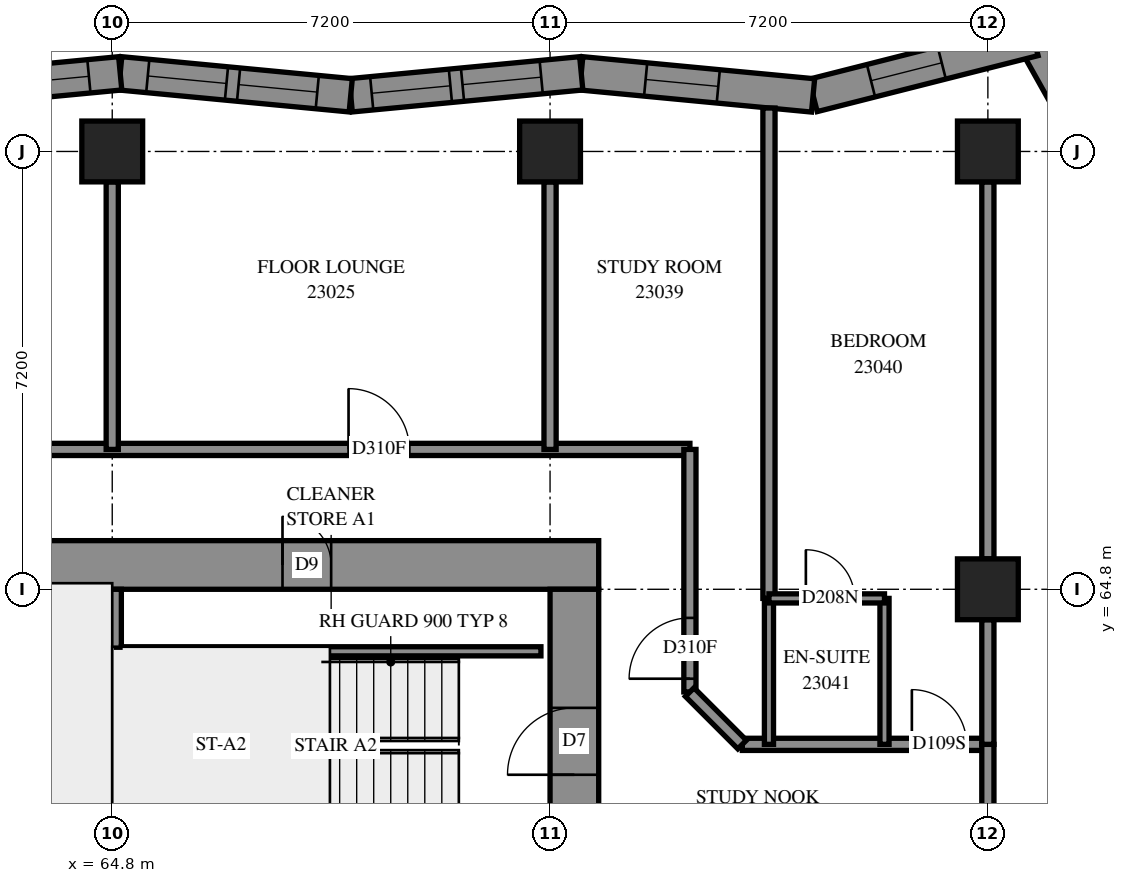
"""IFC4 building model, lengths in metres.
Left out: names, types, materials, properties, quantities, classifications, styles, units other than length and angle.
Written with IfcOpenShell. Run it as: python <this file> out.ifc"""

import sys

from ifc_helpers import new_model, si_unit, direction, frame, frame_2d, origin, origin_2d, place, context, subcontext, project, spatial, polyline, rectangle, outline, extrude, element, fill, save


model = new_model("IFC4")
c1 = context("Model", 3, precision=1e-05, world=origin(), true_north=direction((0.0, 1.0)))
c2 = subcontext(c1, "Body", "Model", "MODEL_VIEW")
j1 = project(units=[si_unit("LENGTHUNIT", "METRE"), si_unit("PLANEANGLEUNIT", "RADIAN")], contexts=[c1])
p1 = place(None, origin())
s1 = spatial("IfcSite", under=j1, at=p1, CompositionType="ELEMENT")
p2 = place(p1, origin())
s2 = spatial("IfcBuilding", under=s1, at=p2, CompositionType="ELEMENT")
p3 = place(p2, frame((0.0, 0.0, 88.0)))
s3 = spatial("IfcBuildingStorey", under=s2, at=p3, CompositionType="ELEMENT", Elevation=88.0)
for number, where, z_axis, x_axis in (
    (1, (64.8, 72.0, 0.0), (0.0, 0.0, 1.0), (1.0, 0.0, 0.0)),
    (2, (72.0, 72.0, 0.0), (0.0, 0.0, 1.0), (1.0, 0.0, 0.0)),
    (3, (79.2, 64.8, 0.0), (0.0, 0.0, 1.0), (1.0, 0.0, 0.0)),
    (4, (79.2, 72.0, 0.0), (0.0, 0.0, 1.0), (1.0, 0.0, 0.0)),
):
    element("IfcColumn", number, at=place(p3, frame(where, z_axis=z_axis, x_axis=x_axis)), inside=s3, PredefinedType="COLUMN", context=c2, shape_type="SweptSolid", body=[
        extrude(rectangle(XDim=1.0, YDim=1.0, at=origin_2d()), origin(), (0.0, 0.0, 1.0), 3.1),
    ])
p4 = place(p3, frame((56.8, 65.2, -0.3), z_axis=(0.0, 0.0, 1.0), x_axis=(1.0, 0.0, 0.0)))
e5 = element("IfcWall", 5, at=p4, inside=s3, PredefinedType="SHEAR", context=c2, shape_type="SweptSolid", body=[
    extrude(rectangle(XDim=16.0, YDim=0.8, at=frame_2d((8.0, 0.0))), origin(), (0.0, 0.0, 1.0), 2.7),
])
p5 = place(p4, frame((10.8, 0.0, 0.3)))
e6 = element("IfcOpeningElement", 6, at=p5, cuts=e5, PredefinedType="OPENING", context=c2, shape_type="SweptSolid", body=[
    extrude(rectangle(XDim=0.8, YDim=2.1, at=frame_2d((0.4, 1.05))), frame((0.0, 0.41, 0.0), z_axis=(0.0, -1.0, 0.0), x_axis=(1.0, 0.0, 0.0)), (0.0, 0.0, 1.0), 0.82),
])
p6 = place(p3, frame((72.4, 50.4, -0.3), z_axis=(0.0, 0.0, 1.0), x_axis=(0.0, 1.0, 0.0)))
e7 = element("IfcWall", 7, at=p6, inside=s3, PredefinedType="SHEAR", context=c2, shape_type="SweptSolid", body=[
    extrude(rectangle(XDim=14.4, YDim=0.8, at=frame_2d((7.2, 0.0))), origin(), (0.0, 0.0, 1.0), 2.7),
])
p7 = place(p6, frame((4.55, 0.0, 0.3)))
e8 = element("IfcOpeningElement", 8, at=p7, cuts=e7, PredefinedType="OPENING", context=c2, shape_type="SweptSolid", body=[
    extrude(rectangle(XDim=1.1, YDim=2.1, at=frame_2d((0.55, 1.05))), frame((0.0, 0.41, 0.0), z_axis=(0.0, -1.0, 0.0), x_axis=(1.0, 0.0, 0.0)), (0.0, 0.0, 1.0), 0.82),
])
p8 = place(p6, frame((11.35, 0.0, 0.3)))
e9 = element("IfcOpeningElement", 9, at=p8, cuts=e7, PredefinedType="OPENING", context=c2, shape_type="SweptSolid", body=[
    extrude(rectangle(XDim=1.1, YDim=2.1, at=frame_2d((0.55, 1.05))), frame((0.0, 0.41, 0.0), z_axis=(0.0, -1.0, 0.0), x_axis=(1.0, 0.0, 0.0)), (0.0, 0.0, 1.0), 0.82),
])
p9 = place(p3, frame((64.8, 60.6, 0.0), z_axis=(0.0, 0.0, 1.0), x_axis=(0.0, 1.0, 0.0)))
e10 = element("IfcWall", 10, at=p9, inside=s3, PredefinedType="SOLIDWALL", context=c2, shape_type="SweptSolid", body=[
    extrude(rectangle(XDim=4.2, YDim=0.3, at=frame_2d((2.1, 0.0))), origin(), (0.0, 0.0, 1.0), 3.1),
])
p10 = place(p3, frame((81.611, 70.892, 0.0), z_axis=(0.0, 0.0, 1.0), x_axis=(-0.4885601475, 0.8725302186, 0.0)))
e11 = element("IfcWall", 11, at=p10, inside=s3, PredefinedType="SOLIDWALL", context=c2, shape_type="SweptSolid", body=[
    extrude(outline(polyline([(0.053, -0.275), (3.593, -0.275), (3.171, 0.275), (-0.053, 0.275), (0.053, -0.275)])), origin(), (0.0, 0.0, 1.0), 3.1),
])
p11 = place(p10, frame((0.793, 0.0, 0.5)))
e12 = element("IfcOpeningElement", 12, at=p11, cuts=e11, PredefinedType="OPENING", context=c2, shape_type="SweptSolid", body=[
    extrude(rectangle(XDim=1.2, YDim=2.45, at=frame_2d((0.6, 1.225))), frame((0.0, 0.285, 0.0), z_axis=(0.0, -1.0, 0.0), x_axis=(1.0, 0.0, 0.0)), (0.0, 0.0, 1.0), 0.57),
])
p12 = place(p3, frame((79.958, 73.843, 0.0), z_axis=(0.0, 0.0, 1.0), x_axis=(-0.9693399067, -0.2457237173, 0.0)))
e13 = element("IfcWall", 13, at=p12, inside=s3, PredefinedType="SOLIDWALL", context=c2, shape_type="SweptSolid", body=[
    extrude(outline(polyline([(-0.211, -0.275), (3.7, -0.275), (3.795, 0.275), (0.211, 0.275), (-0.211, -0.275)])), origin(), (0.0, 0.0, 1.0), 3.1),
])
p13 = place(p12, frame((1.565, 0.0, 0.5)))
e14 = element("IfcOpeningElement", 14, at=p13, cuts=e13, PredefinedType="OPENING", context=c2, shape_type="SweptSolid", body=[
    extrude(rectangle(XDim=1.2, YDim=2.45, at=frame_2d((0.6, 1.225))), frame((0.0, 0.285, 0.0), z_axis=(0.0, -1.0, 0.0), x_axis=(1.0, 0.0, 0.0)), (0.0, 0.0, 1.0), 0.57),
])
p14 = place(p3, frame((76.326, 72.922, 0.0), z_axis=(0.0, 0.0, 1.0), x_axis=(-0.9954951205, 0.0948127894, 0.0)))
e15 = element("IfcWall", 15, at=p14, inside=s3, PredefinedType="SOLIDWALL", context=c2, shape_type="SweptSolid", body=[
    extrude(outline(polyline([(0.048, -0.275), (3.856, -0.275), (3.803, 0.275), (-0.048, 0.275), (0.048, -0.275)])), origin(), (0.0, 0.0, 1.0), 3.1),
])
p15 = place(p14, frame((1.566, 0.0, 0.5)))
e16 = element("IfcOpeningElement", 16, at=p15, cuts=e15, PredefinedType="OPENING", context=c2, shape_type="SweptSolid", body=[
    extrude(rectangle(XDim=1.2, YDim=2.45, at=frame_2d((0.6, 1.225))), frame((0.0, 0.285, 0.0), z_axis=(0.0, -1.0, 0.0), x_axis=(1.0, 0.0, 0.0)), (0.0, 0.0, 1.0), 0.57),
])
p16 = place(p3, frame((72.513, 73.285, 0.0), z_axis=(0.0, 0.0, 1.0), x_axis=(-0.9954966527, -0.0947967005, 0.0)))
e17 = element("IfcWall", 17, at=p16, inside=s3, PredefinedType="SOLIDWALL", context=c2, shape_type="SweptSolid", body=[
    extrude(outline(polyline([(-0.026, -0.275), (3.782, -0.275), (3.834, 0.275), (0.026, 0.275), (-0.026, -0.275)])), origin(), (0.0, 0.0, 1.0), 3.1),
])
p17 = place(p16, frame((0.662, 0.0, 0.5)))
e18 = element("IfcOpeningElement", 18, at=p17, cuts=e17, PredefinedType="OPENING", context=c2, shape_type="SweptSolid", body=[
    extrude(rectangle(XDim=1.3, YDim=2.45, at=frame_2d((0.65, 1.225))), frame((0.0, 0.285, 0.0), z_axis=(0.0, -1.0, 0.0), x_axis=(1.0, 0.0, 0.0)), (0.0, 0.0, 1.0), 0.57),
])
p18 = place(p16, frame((2.162, 0.0, 0.5)))
e19 = element("IfcOpeningElement", 19, at=p18, cuts=e17, PredefinedType="OPENING", context=c2, shape_type="SweptSolid", body=[
    extrude(rectangle(XDim=1.3, YDim=2.45, at=frame_2d((0.65, 1.225))), frame((0.0, 0.285, 0.0), z_axis=(0.0, -1.0, 0.0), x_axis=(1.0, 0.0, 0.0)), (0.0, 0.0, 1.0), 0.57),
])
p19 = place(p3, frame((68.722, 72.924, 0.0), z_axis=(0.0, 0.0, 1.0), x_axis=(-0.9954966527, 0.0947967005, 0.0)))
e20 = element("IfcWall", 20, at=p19, inside=s3, PredefinedType="SOLIDWALL", context=c2, shape_type="SweptSolid", body=[
    extrude(outline(polyline([(0.026, -0.275), (3.834, -0.275), (3.782, 0.275), (-0.026, 0.275), (0.026, -0.275)])), origin(), (0.0, 0.0, 1.0), 3.1),
])
p20 = place(p19, frame((0.553, 0.0, 0.5)))
e21 = element("IfcOpeningElement", 21, at=p20, cuts=e20, PredefinedType="OPENING", context=c2, shape_type="SweptSolid", body=[
    extrude(rectangle(XDim=1.3, YDim=2.45, at=frame_2d((0.65, 1.225))), frame((0.0, 0.285, 0.0), z_axis=(0.0, -1.0, 0.0), x_axis=(1.0, 0.0, 0.0)), (0.0, 0.0, 1.0), 0.57),
])
p21 = place(p19, frame((2.053, 0.0, 0.5)))
e22 = element("IfcOpeningElement", 22, at=p21, cuts=e20, PredefinedType="OPENING", context=c2, shape_type="SweptSolid", body=[
    extrude(rectangle(XDim=1.3, YDim=2.45, at=frame_2d((0.65, 1.225))), frame((0.0, 0.285, 0.0), z_axis=(0.0, -1.0, 0.0), x_axis=(1.0, 0.0, 0.0)), (0.0, 0.0, 1.0), 0.57),
])
p22 = place(p3, frame((64.931, 73.285, 0.0), z_axis=(0.0, 0.0, 1.0), x_axis=(-0.9954966527, -0.0947967005, 0.0)))
e23 = element("IfcWall", 23, at=p22, inside=s3, PredefinedType="SOLIDWALL", context=c2, shape_type="SweptSolid", body=[
    extrude(outline(polyline([(-0.026, -0.275), (3.782, -0.275), (3.834, 0.275), (0.026, 0.275), (-0.026, -0.275)])), origin(), (0.0, 0.0, 1.0), 3.1),
])
p23 = place(p22, frame((0.517, 0.0, 0.5)))
e24 = element("IfcOpeningElement", 24, at=p23, cuts=e23, PredefinedType="OPENING", context=c2, shape_type="SweptSolid", body=[
    extrude(rectangle(XDim=1.3, YDim=2.45, at=frame_2d((0.65, 1.225))), frame((0.0, 0.285, 0.0), z_axis=(0.0, -1.0, 0.0), x_axis=(1.0, 0.0, 0.0)), (0.0, 0.0, 1.0), 0.57),
])
p24 = place(p22, frame((2.017, 0.0, 0.5)))
e25 = element("IfcOpeningElement", 25, at=p24, cuts=e23, PredefinedType="OPENING", context=c2, shape_type="SweptSolid", body=[
    extrude(rectangle(XDim=1.3, YDim=2.45, at=frame_2d((0.65, 1.225))), frame((0.0, 0.285, 0.0), z_axis=(0.0, -1.0, 0.0), x_axis=(1.0, 0.0, 0.0)), (0.0, 0.0, 1.0), 0.57),
])
p25 = place(p3, frame((64.95, 63.78, 0.0), z_axis=(0.0, 0.0, 1.0), x_axis=(1.0, 0.0, 0.0)))
e26 = element("IfcWall", 26, at=p25, inside=s3, PredefinedType="PARTITIONING", context=c2, shape_type="SweptSolid", body=[
    extrude(rectangle(XDim=6.9, YDim=0.15, at=frame_2d((3.45, 0.0))), origin(), (0.0, 0.0, 1.0), 3.1),
])
p26 = place(p3, frame((55.3, 67.1, 0.0), z_axis=(0.0, 0.0, 1.0), x_axis=(1.0, 0.0, 0.0)))
e27 = element("IfcWall", 27, at=p26, inside=s3, PredefinedType="PARTITIONING", context=c2, shape_type="SweptSolid", body=[
    extrude(rectangle(XDim=19.0, YDim=0.2, at=frame_2d((9.5, 0.0))), origin(), (0.0, 0.0, 1.0), 3.1),
])
p27 = place(p26, frame((6.161, 0.0, 0.0)))
e28 = element("IfcOpeningElement", 28, at=p27, cuts=e27, PredefinedType="OPENING", context=c2, shape_type="SweptSolid", body=[
    extrude(rectangle(XDim=0.9, YDim=2.1, at=frame_2d((0.45, 1.05))), frame((0.0, 0.11, 0.0), z_axis=(0.0, -1.0, 0.0), x_axis=(1.0, 0.0, 0.0)), (0.0, 0.0, 1.0), 0.22),
])
p28 = place(p26, frame((13.386, 0.0, 0.0)))
e29 = element("IfcOpeningElement", 29, at=p28, cuts=e27, PredefinedType="OPENING", context=c2, shape_type="SweptSolid", body=[
    extrude(rectangle(XDim=1.0, YDim=2.1, at=frame_2d((0.5, 1.05))), frame((0.0, 0.11, 0.0), z_axis=(0.0, -1.0, 0.0), x_axis=(1.0, 0.0, 0.0)), (0.0, 0.0, 1.0), 0.22),
])
p29 = place(p3, frame((75.6, 64.65, 0.0), z_axis=(0.0, 0.0, 1.0), x_axis=(0.0, 1.0, 0.0)))
e30 = element("IfcWall", 30, at=p29, inside=s3, PredefinedType="PARTITIONING", context=c2, shape_type="SweptSolid", body=[
    extrude(rectangle(XDim=8.065, YDim=0.2, at=frame_2d((4.032, 0.0))), origin(), (0.0, 0.0, 1.0), 3.1),
])
p30 = place(p3, frame((79.2, 65.3, 0.0), z_axis=(0.0, 0.0, 1.0), x_axis=(0.0, 1.0, 0.0)))
e31 = element("IfcWall", 31, at=p30, inside=s3, PredefinedType="PARTITIONING", context=c2, shape_type="SweptSolid", body=[
    extrude(rectangle(XDim=6.2, YDim=0.2, at=frame_2d((3.1, 0.0))), origin(), (0.0, 0.0, 1.0), 3.1),
])
for number, where, z_axis, x_axis in (
    (32, (64.8, 67.1, 0.0), (0.0, 0.0, 1.0), (0.0, 1.0, 0.0)),
    (33, (72.0, 67.1, 0.0), (0.0, 0.0, 1.0), (0.0, 1.0, 0.0)),
):
    element("IfcWall", number, at=place(p3, frame(where, z_axis=z_axis, x_axis=x_axis)), inside=s3, PredefinedType="PARTITIONING", context=c2, shape_type="SweptSolid", body=[
        extrude(rectangle(XDim=4.4, YDim=0.2, at=frame_2d((2.2, 0.0))), origin(), (0.0, 0.0, 1.0), 3.1),
    ])
p31 = place(p3, frame((75.162, 62.25, 0.0), z_axis=(0.0, 0.0, 1.0), x_axis=(1.0, 0.0, 0.0)))
e34 = element("IfcWall", 34, at=p31, inside=s3, PredefinedType="PARTITIONING", context=c2, shape_type="SweptSolid", body=[
    extrude(rectangle(XDim=4.038, YDim=0.2, at=frame_2d((2.019, 0.0))), origin(), (0.0, 0.0, 1.0), 3.1),
])
p32 = place(p31, frame((2.788, 0.0, 0.0)))
e35 = element("IfcOpeningElement", 35, at=p32, cuts=e34, PredefinedType="OPENING", context=c2, shape_type="SweptSolid", body=[
    extrude(rectangle(XDim=0.9, YDim=2.1, at=frame_2d((0.45, 1.05))), frame((0.0, 0.11, 0.0), z_axis=(0.0, -1.0, 0.0), x_axis=(1.0, 0.0, 0.0)), (0.0, 0.0, 1.0), 0.22),
])
p33 = place(p3, frame((74.3, 63.112, 0.0), z_axis=(0.0, 0.0, 1.0), x_axis=(0.0, 1.0, 0.0)))
e36 = element("IfcWall", 36, at=p33, inside=s3, PredefinedType="PARTITIONING", context=c2, shape_type="SweptSolid", body=[
    extrude(rectangle(XDim=3.988, YDim=0.2, at=frame_2d((1.994, 0.0))), origin(), (0.0, 0.0, 1.0), 3.1),
])
p34 = place(p33, frame((0.217, 0.0, 0.0)))
e37 = element("IfcOpeningElement", 37, at=p34, cuts=e36, PredefinedType="OPENING", context=c2, shape_type="SweptSolid", body=[
    extrude(rectangle(XDim=1.0, YDim=2.1, at=frame_2d((0.5, 1.05))), frame((0.0, 0.11, 0.0), z_axis=(0.0, -1.0, 0.0), x_axis=(1.0, 0.0, 0.0)), (0.0, 0.0, 1.0), 0.22),
])
for number, where, z_axis, x_axis in (
    (38, (75.6, 62.25, 0.0), (0.0, 0.0, 1.0), (0.0, 1.0, 0.0)),
    (39, (77.5, 62.25, 0.0), (0.0, 0.0, 1.0), (0.0, 1.0, 0.0)),
):
    element("IfcWall", number, at=place(p3, frame(where, z_axis=z_axis, x_axis=x_axis)), inside=s3, PredefinedType="PARTITIONING", context=c2, shape_type="SweptSolid", body=[
        extrude(rectangle(XDim=2.4, YDim=0.15, at=frame_2d((1.2, 0.0))), origin(), (0.0, 0.0, 1.0), 3.1),
    ])
p35 = place(p3, frame((79.2, 60.15, 0.0), z_axis=(0.0, 0.0, 1.0), x_axis=(0.0, 1.0, 0.0)))
e40 = element("IfcWall", 40, at=p35, inside=s3, PredefinedType="PARTITIONING", context=c2, shape_type="SweptSolid", body=[
    extrude(rectangle(XDim=2.1, YDim=0.2, at=frame_2d((1.05, 0.0))), origin(), (0.0, 0.0, 1.0), 3.1),
])
p36 = place(p3, frame((79.2, 62.25, 0.0), z_axis=(0.0, 0.0, 1.0), x_axis=(0.0, 1.0, 0.0)))
e41 = element("IfcWall", 41, at=p36, inside=s3, PredefinedType="PARTITIONING", context=c2, shape_type="SweptSolid", body=[
    extrude(rectangle(XDim=2.05, YDim=0.2, at=frame_2d((1.025, 0.0))), origin(), (0.0, 0.0, 1.0), 3.1),
])
p37 = place(p3, frame((75.6, 64.65, 0.0), z_axis=(0.0, 0.0, 1.0), x_axis=(1.0, 0.0, 0.0)))
e42 = element("IfcWall", 42, at=p37, inside=s3, PredefinedType="PARTITIONING", context=c2, shape_type="SweptSolid", body=[
    extrude(rectangle(XDim=1.9, YDim=0.15, at=frame_2d((0.95, 0.0))), origin(), (0.0, 0.0, 1.0), 3.1),
])
p38 = place(p37, frame((0.607, 0.0, 0.0)))
e43 = element("IfcOpeningElement", 43, at=p38, cuts=e42, PredefinedType="OPENING", context=c2, shape_type="SweptSolid", body=[
    extrude(rectangle(XDim=0.8, YDim=2.1, at=frame_2d((0.4, 1.05))), frame((0.0, 0.085, 0.0), z_axis=(0.0, -1.0, 0.0), x_axis=(1.0, 0.0, 0.0)), (0.0, 0.0, 1.0), 0.17),
])
p39 = place(p3, frame((74.296, 63.108, 0.0), z_axis=(0.0, 0.0, 1.0), x_axis=(0.7071067812, -0.7071067812, 0.0)))
e44 = element("IfcWall", 44, at=p39, inside=s3, PredefinedType="PARTITIONING", context=c2, shape_type="SweptSolid", body=[
    extrude(rectangle(XDim=1.219, YDim=0.2, at=frame_2d((0.61, 0.0))), origin(), (0.0, 0.0, 1.0), 3.1),
])
p40 = place(p13, origin())
e45 = element("IfcWindow", 45, at=p40, inside=s3, PartitioningType="SINGLE_PANEL", PredefinedType="WINDOW", context=c2, shape_type="SweptSolid", body=[
    extrude(rectangle(XDim=1.2, YDim=2.45, at=frame_2d((0.6, 1.225))), frame((0.0, 0.155, 0.0), z_axis=(0.0, -1.0, 0.0), x_axis=(1.0, 0.0, 0.0)), (0.0, 0.0, 1.0), 0.06),
])
fill(e14, e45)
p41 = place(p15, origin())
e46 = element("IfcWindow", 46, at=p41, inside=s3, PartitioningType="SINGLE_PANEL", PredefinedType="WINDOW", context=c2, shape_type="SweptSolid", body=[
    extrude(rectangle(XDim=1.2, YDim=2.45, at=frame_2d((0.6, 1.225))), frame((0.0, 0.155, 0.0), z_axis=(0.0, -1.0, 0.0), x_axis=(1.0, 0.0, 0.0)), (0.0, 0.0, 1.0), 0.06),
])
fill(e16, e46)
p42 = place(p17, origin())
e47 = element("IfcWindow", 47, at=p42, inside=s3, PartitioningType="SINGLE_PANEL", PredefinedType="WINDOW", context=c2, shape_type="SweptSolid", body=[
    extrude(rectangle(XDim=1.3, YDim=2.45, at=frame_2d((0.65, 1.225))), frame((0.0, 0.155, 0.0), z_axis=(0.0, -1.0, 0.0), x_axis=(1.0, 0.0, 0.0)), (0.0, 0.0, 1.0), 0.06),
])
fill(e18, e47)
p43 = place(p18, origin())
e48 = element("IfcWindow", 48, at=p43, inside=s3, PartitioningType="SINGLE_PANEL", PredefinedType="WINDOW", context=c2, shape_type="SweptSolid", body=[
    extrude(rectangle(XDim=1.3, YDim=2.45, at=frame_2d((0.65, 1.225))), frame((0.0, 0.155, 0.0), z_axis=(0.0, -1.0, 0.0), x_axis=(1.0, 0.0, 0.0)), (0.0, 0.0, 1.0), 0.06),
])
fill(e19, e48)
p44 = place(p20, origin())
e49 = element("IfcWindow", 49, at=p44, inside=s3, PartitioningType="SINGLE_PANEL", PredefinedType="WINDOW", context=c2, shape_type="SweptSolid", body=[
    extrude(rectangle(XDim=1.3, YDim=2.45, at=frame_2d((0.65, 1.225))), frame((0.0, 0.155, 0.0), z_axis=(0.0, -1.0, 0.0), x_axis=(1.0, 0.0, 0.0)), (0.0, 0.0, 1.0), 0.06),
])
fill(e21, e49)
p45 = place(p21, origin())
e50 = element("IfcWindow", 50, at=p45, inside=s3, PartitioningType="SINGLE_PANEL", PredefinedType="WINDOW", context=c2, shape_type="SweptSolid", body=[
    extrude(rectangle(XDim=1.3, YDim=2.45, at=frame_2d((0.65, 1.225))), frame((0.0, 0.155, 0.0), z_axis=(0.0, -1.0, 0.0), x_axis=(1.0, 0.0, 0.0)), (0.0, 0.0, 1.0), 0.06),
])
fill(e22, e50)
p46 = place(p23, origin())
e51 = element("IfcWindow", 51, at=p46, inside=s3, PartitioningType="SINGLE_PANEL", PredefinedType="WINDOW", context=c2, shape_type="SweptSolid", body=[
    extrude(rectangle(XDim=1.3, YDim=2.45, at=frame_2d((0.65, 1.225))), frame((0.0, 0.155, 0.0), z_axis=(0.0, -1.0, 0.0), x_axis=(1.0, 0.0, 0.0)), (0.0, 0.0, 1.0), 0.06),
])
fill(e24, e51)
p47 = place(p5, origin())
e52 = element("IfcDoor", 52, at=p47, inside=s3, OperationType="SINGLE_SWING_RIGHT", PredefinedType="DOOR", context=c2, shape_type="SweptSolid", body=[
    extrude(rectangle(XDim=0.8, YDim=2.1, at=frame_2d((0.4, 1.05))), frame((0.0, -0.34, 0.0), z_axis=(0.0, -1.0, 0.0), x_axis=(1.0, 0.0, 0.0)), (0.0, 0.0, 1.0), 0.05),
])
fill(e6, e52)
p48 = place(p8, origin())
e53 = element("IfcDoor", 53, at=p48, inside=s3, OperationType="SINGLE_SWING_RIGHT", PredefinedType="DOOR", context=c2, shape_type="SweptSolid", body=[
    extrude(rectangle(XDim=1.1, YDim=2.1, at=frame_2d((0.55, 1.05))), frame((0.0, 0.025, 0.0), z_axis=(0.0, -1.0, 0.0), x_axis=(1.0, 0.0, 0.0)), (0.0, 0.0, 1.0), 0.05),
])
fill(e9, e53)
p49 = place(p28, origin())
e54 = element("IfcDoor", 54, at=p49, inside=s3, OperationType="SINGLE_SWING_RIGHT", PredefinedType="DOOR", context=c2, shape_type="SweptSolid", body=[
    extrude(rectangle(XDim=1.0, YDim=2.1, at=frame_2d((0.5, 1.05))), frame((0.0, 0.025, 0.0), z_axis=(0.0, -1.0, 0.0), x_axis=(1.0, 0.0, 0.0)), (0.0, 0.0, 1.0), 0.05),
])
fill(e29, e54)
p50 = place(p34, origin())
e55 = element("IfcDoor", 55, at=p50, inside=s3, OperationType="SINGLE_SWING_RIGHT", PredefinedType="DOOR", context=c2, shape_type="SweptSolid", body=[
    extrude(rectangle(XDim=1.0, YDim=2.1, at=frame_2d((0.5, 1.05))), frame((0.0, 0.025, 0.0), z_axis=(0.0, -1.0, 0.0), x_axis=(1.0, 0.0, 0.0)), (0.0, 0.0, 1.0), 0.05),
])
fill(e37, e55)
p51 = place(p32, origin())
e56 = element("IfcDoor", 56, at=p51, inside=s3, OperationType="SINGLE_SWING_LEFT", PredefinedType="DOOR", context=c2, shape_type="SweptSolid", body=[
    extrude(rectangle(XDim=0.9, YDim=2.1, at=frame_2d((0.45, 1.05))), frame((0.0, 0.025, 0.0), z_axis=(0.0, -1.0, 0.0), x_axis=(1.0, 0.0, 0.0)), (0.0, 0.0, 1.0), 0.05),
])
fill(e35, e56)
p52 = place(p38, origin())
e57 = element("IfcDoor", 57, at=p52, inside=s3, OperationType="SINGLE_SWING_RIGHT", PredefinedType="DOOR", context=c2, shape_type="SweptSolid", body=[
    extrude(rectangle(XDim=0.8, YDim=2.1, at=frame_2d((0.4, 1.05))), frame((0.0, 0.025, 0.0), z_axis=(0.0, -1.0, 0.0), x_axis=(1.0, 0.0, 0.0)), (0.0, 0.0, 1.0), 0.05),
])
fill(e43, e57)
save(model, sys.argv[1])
